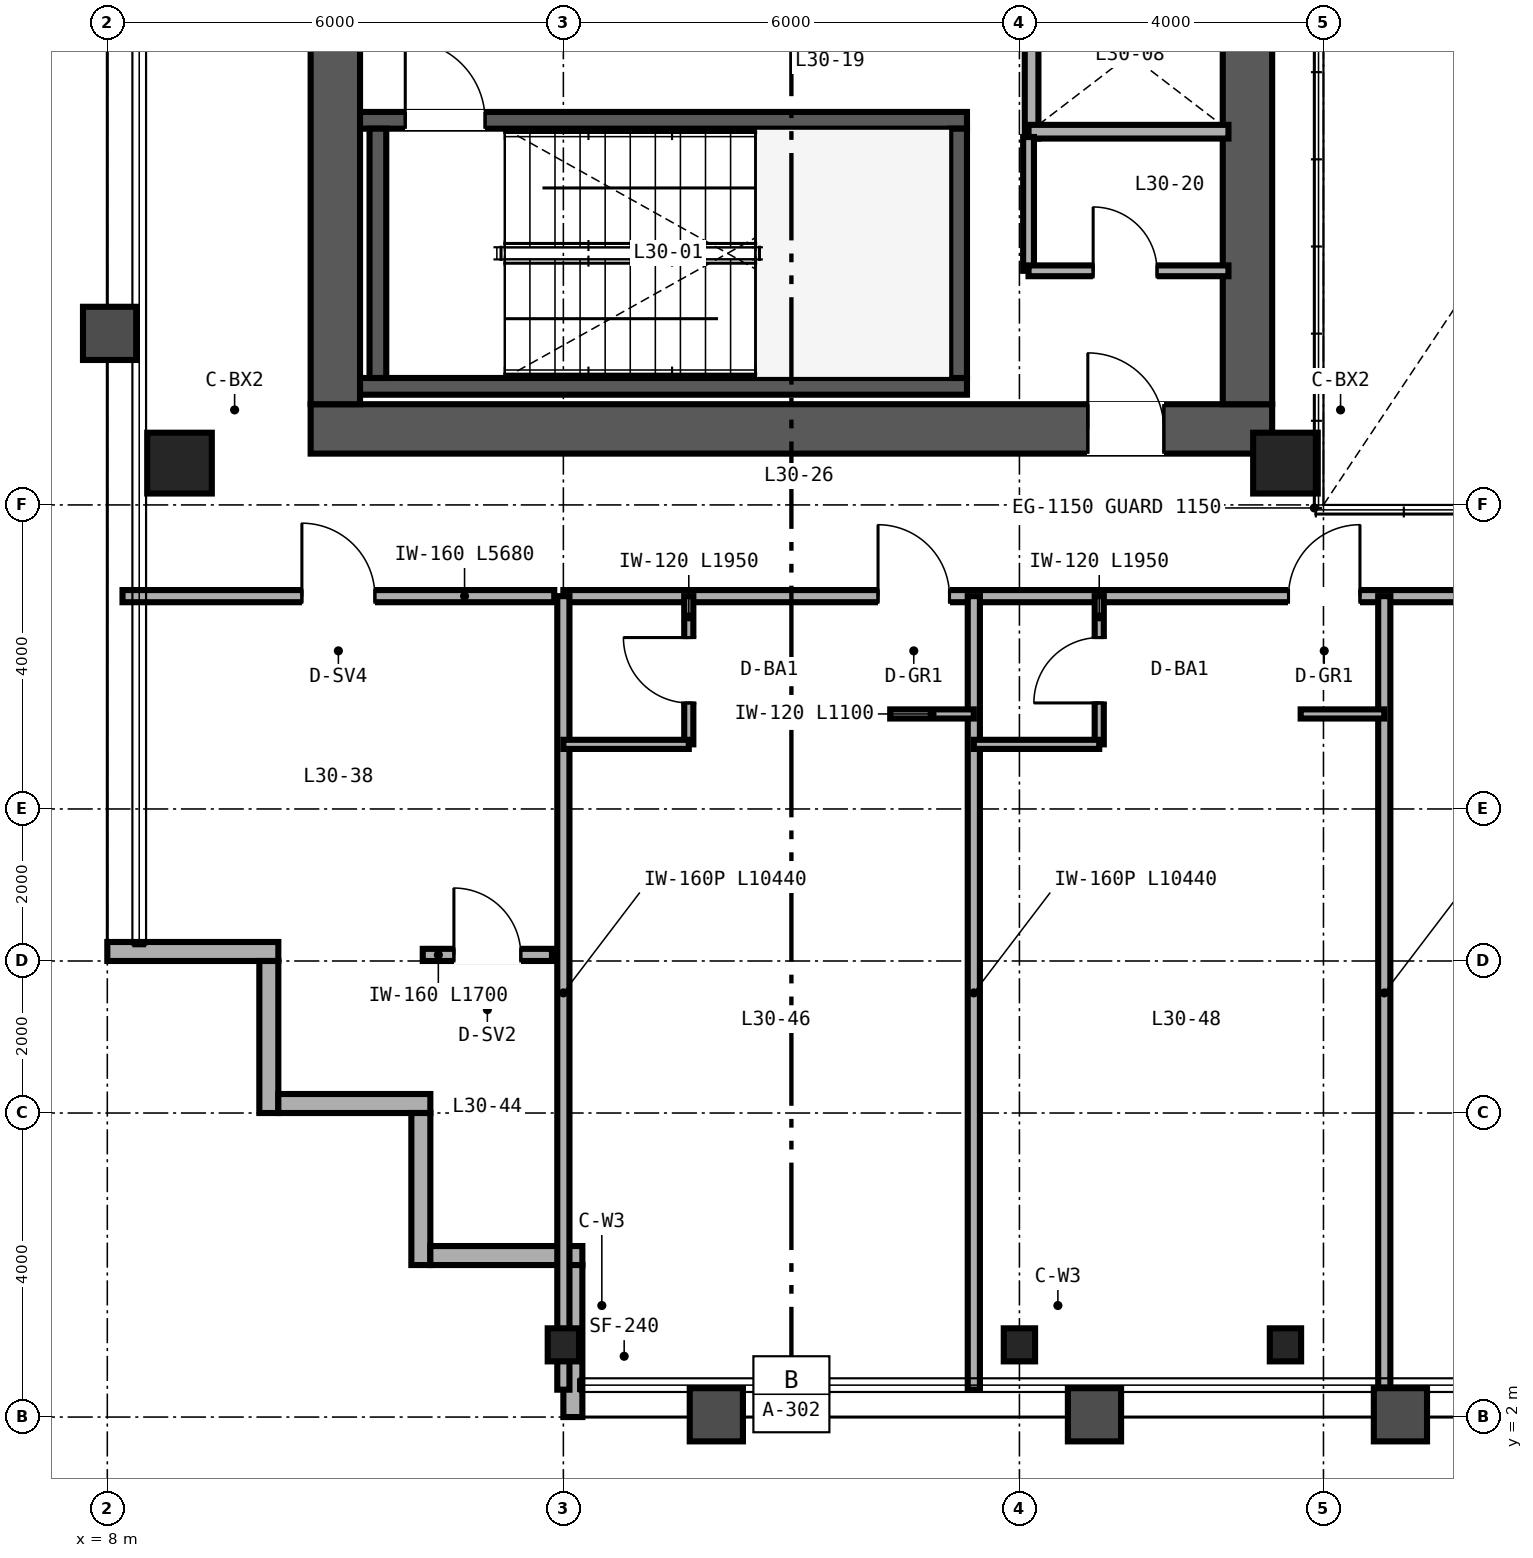
"""IFC4 building model, lengths in metres.
Left out: names, types, materials, properties, quantities, classifications, styles, units other than length and angle.
Written with IfcOpenShell. Run it as: python <this file> out.ifc"""

import sys

from ifc_helpers import new_model, si_unit, direction, frame, frame_2d, origin, origin_2d, place, context, subcontext, project, spatial, rectangle, hollow_rectangle, i_section, extrude, source, transform, mapped, element, fill, save


model = new_model("IFC4")
c1 = context("Model", 3, precision=1e-05, world=origin(), true_north=direction((0.0, 1.0)))
c2 = subcontext(c1, "Body", "Model", "MODEL_VIEW")
j1 = project(units=[si_unit("LENGTHUNIT", "METRE"), si_unit("PLANEANGLEUNIT", "RADIAN")], contexts=[c1])
p1 = place(None, origin())
s1 = spatial("IfcSite", under=j1, at=p1, CompositionType="ELEMENT")
p2 = place(p1, origin())
s2 = spatial("IfcBuilding", under=s1, at=p2, CompositionType="ELEMENT")
p3 = place(p2, frame((0.0, 0.0, 122.4)))
s3 = spatial("IfcBuildingStorey", under=s2, at=p3, CompositionType="ELEMENT", Elevation=122.4)
p4 = place(p3, frame((10.675, 15.0, 0.0), z_axis=(0.0, 0.0, 1.0), x_axis=(1.0, 0.0, 0.0)))
e1 = element("IfcWall", 1, at=p4, inside=s3, PredefinedType="SHEAR", context=c2, shape_type="SweptSolid", body=[
    extrude(rectangle(XDim=12.65, YDim=0.65, at=frame_2d((6.325, 0.0))), origin(), (0.0, 0.0, 1.0), 3.36),
])
p5 = place(p4, frame((10.225, 0.0, 0.0)))
e2 = element("IfcOpeningElement", 2, at=p5, cuts=e1, PredefinedType="OPENING", context=c2, shape_type="SweptSolid", body=[
    extrude(rectangle(XDim=1.0, YDim=2.15, at=frame_2d((0.5, 1.075))), frame((0.0, 0.335, 0.0), z_axis=(0.0, -1.0, 0.0), x_axis=(1.0, 0.0, 0.0)), (0.0, 0.0, 1.0), 0.67),
])
for number, where, z_axis, x_axis in (
    (3, (11.0, 15.325, 0.0), (0.0, 0.0, 1.0), (0.0, 1.0, 0.0)),
    (4, (23.0, 15.325, 0.0), (0.0, 0.0, 1.0), (0.0, 1.0, 0.0)),
):
    element("IfcWall", number, at=place(p3, frame(where, z_axis=z_axis, x_axis=x_axis)), inside=s3, PredefinedType="SHEAR", context=c2, shape_type="SweptSolid", body=[
        extrude(rectangle(XDim=21.35, YDim=0.65, at=frame_2d((10.675, 0.0))), origin(), (0.0, 0.0, 1.0), 3.36),
    ])
p6 = place(p3, frame((11.325, 15.56, 0.0), z_axis=(0.0, 0.0, 1.0), x_axis=(1.0, 0.0, 0.0)))
e5 = element("IfcWall", 5, at=p6, inside=s3, PredefinedType="SHEAR", context=c2, shape_type="SweptSolid", body=[
    extrude(rectangle(XDim=7.985, YDim=0.22, at=frame_2d((3.993, 0.0))), origin(), (0.0, 0.0, 1.0), 3.4),
])
p7 = place(p3, frame((11.325, 19.06, 0.0), z_axis=(0.0, 0.0, 1.0), x_axis=(1.0, 0.0, 0.0)))
e6 = element("IfcWall", 6, at=p7, inside=s3, PredefinedType="SHEAR", context=c2, shape_type="SweptSolid", body=[
    extrude(rectangle(XDim=7.985, YDim=0.22, at=frame_2d((3.993, 0.0))), origin(), (0.0, 0.0, 1.0), 3.4),
])
p8 = place(p7, frame((0.595, 0.0, 0.0)))
e7 = element("IfcOpeningElement", 7, at=p8, cuts=e6, PredefinedType="OPENING", context=c2, shape_type="SweptSolid", body=[
    extrude(rectangle(XDim=1.05, YDim=2.15, at=frame_2d((0.525, 1.075))), frame((0.0, 0.12, 0.0), z_axis=(0.0, -1.0, 0.0), x_axis=(1.0, 0.0, 0.0)), (0.0, 0.0, 1.0), 0.24),
])
for number, where, z_axis, x_axis in (
    (8, (11.56, 15.67, 0.0), (0.0, 0.0, 1.0), (0.0, 1.0, 0.0)),
    (9, (19.2, 15.67, 0.0), (0.0, 0.0, 1.0), (0.0, 1.0, 0.0)),
):
    element("IfcWall", number, at=place(p3, frame(where, z_axis=z_axis, x_axis=x_axis)), inside=s3, PredefinedType="SHEAR", context=c2, shape_type="SweptSolid", body=[
        extrude(rectangle(XDim=3.28, YDim=0.22, at=frame_2d((1.64, 0.0))), origin(), (0.0, 0.0, 1.0), 3.4),
    ])
m1 = source(origin(), c2, "Body", "SweptSolid", [
    extrude(hollow_rectangle(XDim=0.85, YDim=0.8, WallThickness=0.032, at=origin_2d()), origin(), (0.0, 0.0, 1.0), 3.36),
])
for number, where, z_axis, x_axis in (
    (10, (8.95, 14.55, 0.0), (0.0, 0.0, 1.0), (1.0, 0.0, 0.0)),
    (11, (23.5, 14.55, 0.0), (0.0, 0.0, 1.0), (1.0, 0.0, 0.0)),
):
    element("IfcColumn", number, at=place(p3, frame(where, z_axis=z_axis, x_axis=x_axis)), inside=s3, PredefinedType="COLUMN", context=c2, shape_type="MappedRepresentation", body=[
        mapped(m1, transform((0.0, 0.0, 0.0), scale=1.0)),
    ])
m2 = source(origin(), c2, "Body", "SweptSolid", [
    extrude(i_section(OverallWidth=0.412, OverallDepth=0.435, WebThickness=0.036, FlangeThickness=0.057, FilletRadius=0.025, at=origin_2d()), origin(), (0.0, 0.0, 1.0), 3.36),
])
for number, where, z_axis, x_axis in (
    (12, (14.0, 2.95, 0.0), (0.0, 0.0, 1.0), (1.0, 0.0, 0.0)),
    (13, (20.0, 2.95, 0.0), (0.0, 0.0, 1.0), (1.0, 0.0, 0.0)),
    (14, (23.5, 2.95, 0.0), (0.0, 0.0, 1.0), (1.0, 0.0, 0.0)),
):
    element("IfcColumn", number, at=place(p3, frame(where, z_axis=z_axis, x_axis=x_axis)), inside=s3, PredefinedType="COLUMN", context=c2, shape_type="MappedRepresentation", body=[
        mapped(m2, transform((0.0, 0.0, 0.0), scale=1.0)),
    ])
p9 = place(p3, frame((8.0, 8.125, 0.0), z_axis=(0.0, 0.0, 1.0), x_axis=(1.0, 0.0, 0.0)))
e15 = element("IfcWall", 15, at=p9, inside=s3, PredefinedType="SOLIDWALL", context=c2, shape_type="SweptSolid", body=[
    extrude(rectangle(XDim=2.25, YDim=0.25, at=frame_2d((1.125, 0.0))), origin(), (0.0, 0.0, 1.0), 3.36),
])
for number, where, z_axis, x_axis in (
    (16, (10.125, 8.0, 0.0), (0.0, 0.0, 1.0), (0.0, -1.0, 0.0)),
    (17, (10.25, 6.125, 0.0), (0.0, 0.0, 1.0), (1.0, 0.0, 0.0)),
    (18, (12.125, 6.0, 0.0), (0.0, 0.0, 1.0), (0.0, -1.0, 0.0)),
    (19, (12.25, 4.125, 0.0), (0.0, 0.0, 1.0), (1.0, 0.0, 0.0)),
):
    element("IfcWall", number, at=place(p3, frame(where, z_axis=z_axis, x_axis=x_axis)), inside=s3, PredefinedType="SOLIDWALL", context=c2, shape_type="SweptSolid", body=[
        extrude(rectangle(XDim=2.0, YDim=0.25, at=frame_2d((1.0, 0.0))), origin(), (0.0, 0.0, 1.0), 3.36),
    ])
p10 = place(p3, frame((14.125, 4.0, 0.0), z_axis=(0.0, 0.0, 1.0), x_axis=(0.0, -1.0, 0.0)))
e20 = element("IfcWall", 20, at=p10, inside=s3, PredefinedType="SOLIDWALL", context=c2, shape_type="SweptSolid", body=[
    extrude(rectangle(XDim=2.0, YDim=0.25, at=frame_2d((1.0, 0.0))), origin(), (0.0, 0.0, 1.0), 2.667),
])
p11 = place(p3, frame((20.16, 18.82, 0.0), z_axis=(0.0, 0.0, 1.0), x_axis=(0.0, 1.0, 0.0)))
e21 = element("IfcWall", 21, at=p11, inside=s3, PredefinedType="SOLIDWALL", context=c2, shape_type="SweptSolid", body=[
    extrude(rectangle(XDim=6.32, YDim=0.18, at=frame_2d((3.16, 0.0))), origin(), (0.0, 0.0, 1.0), 2.36),
])
p12 = place(p3, frame((20.12, 18.91, 0.0), z_axis=(0.0, 0.0, 1.0), x_axis=(1.0, 0.0, 0.0)))
e22 = element("IfcWall", 22, at=p12, inside=s3, PredefinedType="SOLIDWALL", context=c2, shape_type="SweptSolid", body=[
    extrude(rectangle(XDim=2.63, YDim=0.18, at=frame_2d((1.315, 0.0))), origin(), (0.0, 0.0, 1.0), 3.36),
])
p13 = place(p3, frame((20.12, 17.08, 0.0), z_axis=(0.0, 0.0, 1.0), x_axis=(0.0, 1.0, 0.0)))
e23 = element("IfcWall", 23, at=p13, inside=s3, PredefinedType="PARTITIONING", context=c2, shape_type="SweptSolid", body=[
    extrude(rectangle(XDim=1.76, YDim=0.142, at=frame_2d((0.88, 0.0))), origin(), (0.0, 0.0, 1.0), 3.36),
])
p14 = place(p3, frame((20.12, 17.08, 0.0), z_axis=(0.0, 0.0, 1.0), x_axis=(1.0, 0.0, 0.0)))
e24 = element("IfcWall", 24, at=p14, inside=s3, PredefinedType="PARTITIONING", context=c2, shape_type="SweptSolid", body=[
    extrude(rectangle(XDim=2.63, YDim=0.142, at=frame_2d((1.315, 0.0))), origin(), (0.0, 0.0, 1.0), 3.36),
])
p15 = place(p14, frame((0.85, 0.0, 0.0)))
e25 = element("IfcOpeningElement", 25, at=p15, cuts=e24, PredefinedType="OPENING", context=c2, shape_type="SweptSolid", body=[
    extrude(rectangle(XDim=0.84, YDim=2.1, at=frame_2d((0.42, 1.05))), frame((0.0, 0.081, 0.0), z_axis=(0.0, -1.0, 0.0), x_axis=(1.0, 0.0, 0.0)), (0.0, 0.0, 1.0), 0.162),
])
p16 = place(p3, frame((8.2, 12.8, 0.0), z_axis=(0.0, 0.0, 1.0), x_axis=(1.0, 0.0, 0.0)))
e26 = element("IfcWall", 26, at=p16, inside=s3, PredefinedType="PARTITIONING", context=c2, shape_type="SweptSolid", body=[
    extrude(rectangle(XDim=5.68, YDim=0.16, at=frame_2d((2.84, 0.0))), origin(), (0.0, 0.0, 1.0), 3.36),
])
p17 = place(p16, frame((2.36, 0.0, 0.0)))
e27 = element("IfcOpeningElement", 27, at=p17, cuts=e26, PredefinedType="OPENING", context=c2, shape_type="SweptSolid", body=[
    extrude(rectangle(XDim=0.96, YDim=2.15, at=frame_2d((0.48, 1.075))), frame((0.0, 0.09, 0.0), z_axis=(0.0, -1.0, 0.0), x_axis=(1.0, 0.0, 0.0)), (0.0, 0.0, 1.0), 0.18),
])
p18 = place(p3, frame((12.15, 8.08, 0.0), z_axis=(0.0, 0.0, 1.0), x_axis=(1.0, 0.0, 0.0)))
e28 = element("IfcWall", 28, at=p18, inside=s3, PredefinedType="PARTITIONING", context=c2, shape_type="SweptSolid", body=[
    extrude(rectangle(XDim=1.7, YDim=0.16, at=frame_2d((0.85, 0.0))), origin(), (0.0, 0.0, 1.0), 3.36),
])
p19 = place(p18, frame((0.41, 0.0, 0.0)))
e29 = element("IfcOpeningElement", 29, at=p19, cuts=e28, PredefinedType="OPENING", context=c2, shape_type="SweptSolid", body=[
    extrude(rectangle(XDim=0.88, YDim=2.15, at=frame_2d((0.44, 1.075))), frame((0.0, 0.09, 0.0), z_axis=(0.0, -1.0, 0.0), x_axis=(1.0, 0.0, 0.0)), (0.0, 0.0, 1.0), 0.18),
])
p20 = place(p3, frame((14.0, 12.8, 0.0), z_axis=(0.0, 0.0, 1.0), x_axis=(1.0, 0.0, 0.0)))
e30 = element("IfcWall", 30, at=p20, inside=s3, PredefinedType="PARTITIONING", context=c2, shape_type="SweptSolid", body=[
    extrude(rectangle(XDim=36.0, YDim=0.16, at=frame_2d((18.0, 0.0))), origin(), (0.0, 0.0, 1.0), 2.581),
])
p21 = place(p20, frame((4.14, 0.0, 0.0)))
e31 = element("IfcOpeningElement", 31, at=p21, cuts=e30, PredefinedType="OPENING", context=c2, shape_type="SweptSolid", body=[
    extrude(rectangle(XDim=0.94, YDim=2.15, at=frame_2d((0.47, 1.075))), frame((0.0, 0.09, 0.0), z_axis=(0.0, -1.0, 0.0), x_axis=(1.0, 0.0, 0.0)), (0.0, 0.0, 1.0), 0.18),
])
p22 = place(p20, frame((9.54, 0.0, 0.0)))
e32 = element("IfcOpeningElement", 32, at=p22, cuts=e30, PredefinedType="OPENING", context=c2, shape_type="SweptSolid", body=[
    extrude(rectangle(XDim=0.94, YDim=2.15, at=frame_2d((0.47, 1.075))), frame((0.0, 0.09, 0.0), z_axis=(0.0, -1.0, 0.0), x_axis=(1.0, 0.0, 0.0)), (0.0, 0.0, 1.0), 0.18),
])
p23 = place(p20, frame((13.22, 0.0, 0.0)))
e33 = element("IfcOpeningElement", 33, at=p23, cuts=e30, PredefinedType="OPENING", context=c2, shape_type="SweptSolid", body=[
    extrude(rectangle(XDim=0.96, YDim=2.15, at=frame_2d((0.48, 1.075))), frame((0.0, 0.09, 0.0), z_axis=(0.0, -1.0, 0.0), x_axis=(1.0, 0.0, 0.0)), (0.0, 0.0, 1.0), 0.18),
])
p24 = place(p20, frame((19.02, 0.0, 0.0)))
e34 = element("IfcOpeningElement", 34, at=p24, cuts=e30, PredefinedType="OPENING", context=c2, shape_type="SweptSolid", body=[
    extrude(rectangle(XDim=0.96, YDim=2.15, at=frame_2d((0.48, 1.075))), frame((0.0, 0.09, 0.0), z_axis=(0.0, -1.0, 0.0), x_axis=(1.0, 0.0, 0.0)), (0.0, 0.0, 1.0), 0.18),
])
p25 = place(p20, frame((24.62, 0.0, 0.0)))
e35 = element("IfcOpeningElement", 35, at=p25, cuts=e30, PredefinedType="OPENING", context=c2, shape_type="SweptSolid", body=[
    extrude(rectangle(XDim=0.96, YDim=2.15, at=frame_2d((0.48, 1.075))), frame((0.0, 0.09, 0.0), z_axis=(0.0, -1.0, 0.0), x_axis=(1.0, 0.0, 0.0)), (0.0, 0.0, 1.0), 0.18),
])
p26 = place(p20, frame((30.74, 0.0, 0.0)))
e36 = element("IfcOpeningElement", 36, at=p26, cuts=e30, PredefinedType="OPENING", context=c2, shape_type="SweptSolid", body=[
    extrude(rectangle(XDim=0.94, YDim=2.15, at=frame_2d((0.47, 1.075))), frame((0.0, 0.09, 0.0), z_axis=(0.0, -1.0, 0.0), x_axis=(1.0, 0.0, 0.0)), (0.0, 0.0, 1.0), 0.18),
])
p27 = place(p20, frame((33.52, 0.0, 0.0)))
e37 = element("IfcOpeningElement", 37, at=p27, cuts=e30, PredefinedType="OPENING", context=c2, shape_type="SweptSolid", body=[
    extrude(rectangle(XDim=0.96, YDim=2.15, at=frame_2d((0.48, 1.075))), frame((0.0, 0.09, 0.0), z_axis=(0.0, -1.0, 0.0), x_axis=(1.0, 0.0, 0.0)), (0.0, 0.0, 1.0), 0.18),
])
for number, where, z_axis, x_axis in (
    (38, (14.0, 2.36, 0.0), (0.0, 0.0, 1.0), (0.0, 1.0, 0.0)),
    (39, (19.4, 2.36, 0.0), (0.0, 0.0, 1.0), (0.0, 1.0, 0.0)),
):
    element("IfcWall", number, at=place(p3, frame(where, z_axis=z_axis, x_axis=x_axis)), inside=s3, PredefinedType="PARTITIONING", context=c2, shape_type="SweptSolid", body=[
        extrude(rectangle(XDim=10.44, YDim=0.16, at=frame_2d((5.22, 0.0))), origin(), (0.0, 0.0, 1.0), 2.667),
    ])
p28 = place(p3, frame((15.65, 10.85, 0.0), z_axis=(0.0, 0.0, 1.0), x_axis=(0.0, 1.0, 0.0)))
e40 = element("IfcWall", 40, at=p28, inside=s3, PredefinedType="PARTITIONING", context=c2, shape_type="SweptSolid", body=[
    extrude(rectangle(XDim=1.95, YDim=0.12, at=frame_2d((0.975, 0.0))), origin(), (0.0, 0.0, 1.0), 3.36),
])
p29 = place(p28, frame((0.545, 0.0, 0.0)))
e41 = element("IfcOpeningElement", 41, at=p29, cuts=e40, PredefinedType="OPENING", context=c2, shape_type="SweptSolid", body=[
    extrude(rectangle(XDim=0.86, YDim=2.1, at=frame_2d((0.43, 1.05))), frame((0.0, 0.07, 0.0), z_axis=(0.0, -1.0, 0.0), x_axis=(1.0, 0.0, 0.0)), (0.0, 0.0, 1.0), 0.14),
])
p30 = place(p3, frame((14.0, 10.85, 0.0), z_axis=(0.0, 0.0, 1.0), x_axis=(1.0, 0.0, 0.0)))
e42 = element("IfcWall", 42, at=p30, inside=s3, PredefinedType="PARTITIONING", context=c2, shape_type="SweptSolid", body=[
    extrude(rectangle(XDim=1.65, YDim=0.12, at=frame_2d((0.825, 0.0))), origin(), (0.0, 0.0, 1.0), 3.36),
])
p31 = place(p3, frame((18.3, 11.25, 0.0), z_axis=(0.0, 0.0, 1.0), x_axis=(1.0, 0.0, 0.0)))
e43 = element("IfcWall", 43, at=p31, inside=s3, PredefinedType="PARTITIONING", context=c2, shape_type="SweptSolid", body=[
    extrude(rectangle(XDim=1.1, YDim=0.12, at=frame_2d((0.55, 0.0))), origin(), (0.0, 0.0, 1.0), 3.36),
])
p32 = place(p3, frame((24.8, 2.36, 0.0), z_axis=(0.0, 0.0, 1.0), x_axis=(0.0, 1.0, 0.0)))
e44 = element("IfcWall", 44, at=p32, inside=s3, PredefinedType="PARTITIONING", context=c2, shape_type="SweptSolid", body=[
    extrude(rectangle(XDim=10.44, YDim=0.16, at=frame_2d((5.22, 0.0))), origin(), (0.0, 0.0, 1.0), 2.433),
])
p33 = place(p3, frame((21.05, 10.85, 0.0), z_axis=(0.0, 0.0, 1.0), x_axis=(0.0, 1.0, 0.0)))
e45 = element("IfcWall", 45, at=p33, inside=s3, PredefinedType="PARTITIONING", context=c2, shape_type="SweptSolid", body=[
    extrude(rectangle(XDim=1.95, YDim=0.12, at=frame_2d((0.975, 0.0))), origin(), (0.0, 0.0, 1.0), 3.36),
])
p34 = place(p33, frame((0.545, 0.0, 0.0)))
e46 = element("IfcOpeningElement", 46, at=p34, cuts=e45, PredefinedType="OPENING", context=c2, shape_type="SweptSolid", body=[
    extrude(rectangle(XDim=0.86, YDim=2.1, at=frame_2d((0.43, 1.05))), frame((0.0, 0.07, 0.0), z_axis=(0.0, -1.0, 0.0), x_axis=(1.0, 0.0, 0.0)), (0.0, 0.0, 1.0), 0.14),
])
p35 = place(p3, frame((19.4, 10.85, 0.0), z_axis=(0.0, 0.0, 1.0), x_axis=(1.0, 0.0, 0.0)))
e47 = element("IfcWall", 47, at=p35, inside=s3, PredefinedType="PARTITIONING", context=c2, shape_type="SweptSolid", body=[
    extrude(rectangle(XDim=1.65, YDim=0.12, at=frame_2d((0.825, 0.0))), origin(), (0.0, 0.0, 1.0), 3.36),
])
p36 = place(p3, frame((23.7, 11.25, 0.0), z_axis=(0.0, 0.0, 1.0), x_axis=(1.0, 0.0, 0.0)))
e48 = element("IfcWall", 48, at=p36, inside=s3, PredefinedType="PARTITIONING", context=c2, shape_type="SweptSolid", body=[
    extrude(rectangle(XDim=1.1, YDim=0.12, at=frame_2d((0.55, 0.0))), origin(), (0.0, 0.0, 1.0), 2.581),
])
m3 = source(origin(), c2, "Body", "SweptSolid", [
    extrude(rectangle(XDim=1.05, YDim=2.15, at=frame_2d((0.525, 1.075))), frame((0.0, 0.025, 0.0), z_axis=(0.0, -1.0, 0.0), x_axis=(1.0, 0.0, 0.0)), (0.0, 0.0, 1.0), 0.05),
])
p37 = place(p8, origin())
e49 = element("IfcDoor", 49, at=p37, inside=s3, OperationType="SINGLE_SWING_LEFT", PredefinedType="DOOR", context=c2, shape_type="MappedRepresentation", body=[
    mapped(m3, transform((0.0, 0.0, 0.0), scale=1.0)),
])
fill(e7, e49)
m4 = source(origin(), c2, "Body", "SweptSolid", [
    extrude(rectangle(XDim=0.84, YDim=2.1, at=frame_2d((0.42, 1.05))), frame((0.0, 0.025, 0.0), z_axis=(0.0, -1.0, 0.0), x_axis=(1.0, 0.0, 0.0)), (0.0, 0.0, 1.0), 0.05),
])
p38 = place(p15, origin())
e50 = element("IfcDoor", 50, at=p38, inside=s3, OperationType="SINGLE_SWING_LEFT", PredefinedType="DOOR", context=c2, shape_type="MappedRepresentation", body=[
    mapped(m4, transform((0.0, 0.0, 0.0), scale=1.0)),
])
fill(e25, e50)
m5 = source(origin(), c2, "Body", "SweptSolid", [
    extrude(rectangle(XDim=1.0, YDim=2.15, at=frame_2d((0.5, 1.075))), frame((0.0, 0.025, 0.0), z_axis=(0.0, -1.0, 0.0), x_axis=(1.0, 0.0, 0.0)), (0.0, 0.0, 1.0), 0.05),
])
p39 = place(p5, origin())
e51 = element("IfcDoor", 51, at=p39, inside=s3, OperationType="SINGLE_SWING_LEFT", PredefinedType="DOOR", context=c2, shape_type="MappedRepresentation", body=[
    mapped(m5, transform((0.0, 0.0, 0.0), scale=1.0)),
])
fill(e2, e51)
m6 = source(origin(), c2, "Body", "SweptSolid", [
    extrude(rectangle(XDim=0.96, YDim=2.15, at=frame_2d((0.48, 1.075))), frame((0.0, 0.025, 0.0), z_axis=(0.0, -1.0, 0.0), x_axis=(1.0, 0.0, 0.0)), (0.0, 0.0, 1.0), 0.05),
])
p40 = place(p17, origin())
e52 = element("IfcDoor", 52, at=p40, inside=s3, OperationType="SINGLE_SWING_LEFT", PredefinedType="DOOR", context=c2, shape_type="MappedRepresentation", body=[
    mapped(m6, transform((0.0, 0.0, 0.0), scale=1.0)),
])
fill(e27, e52)
m7 = source(origin(), c2, "Body", "SweptSolid", [
    extrude(rectangle(XDim=0.88, YDim=2.15, at=frame_2d((0.44, 1.075))), frame((0.0, 0.025, 0.0), z_axis=(0.0, -1.0, 0.0), x_axis=(1.0, 0.0, 0.0)), (0.0, 0.0, 1.0), 0.05),
])
p41 = place(p19, origin())
e53 = element("IfcDoor", 53, at=p41, inside=s3, OperationType="SINGLE_SWING_LEFT", PredefinedType="DOOR", context=c2, shape_type="MappedRepresentation", body=[
    mapped(m7, transform((0.0, 0.0, 0.0), scale=1.0)),
])
fill(e29, e53)
m8 = source(origin(), c2, "Body", "SweptSolid", [
    extrude(rectangle(XDim=0.86, YDim=2.1, at=frame_2d((0.43, 1.05))), frame((0.0, 0.025, 0.0), z_axis=(0.0, -1.0, 0.0), x_axis=(1.0, 0.0, 0.0)), (0.0, 0.0, 1.0), 0.05),
])
p42 = place(p29, origin())
e54 = element("IfcDoor", 54, at=p42, inside=s3, OperationType="SINGLE_SWING_RIGHT", PredefinedType="DOOR", context=c2, shape_type="MappedRepresentation", body=[
    mapped(m8, transform((0.0, 0.0, 0.0), scale=1.0)),
])
fill(e41, e54)
p43 = place(p34, origin())
e55 = element("IfcDoor", 55, at=p43, inside=s3, OperationType="SINGLE_SWING_LEFT", PredefinedType="DOOR", context=c2, shape_type="MappedRepresentation", body=[
    mapped(m8, transform((0.0, 0.0, 0.0), scale=1.0)),
])
fill(e46, e55)
m9 = source(origin(), c2, "Body", "SweptSolid", [
    extrude(rectangle(XDim=0.94, YDim=2.15, at=frame_2d((0.47, 1.075))), frame((0.0, 0.025, 0.0), z_axis=(0.0, -1.0, 0.0), x_axis=(1.0, 0.0, 0.0)), (0.0, 0.0, 1.0), 0.05),
])
p44 = place(p21, origin())
e56 = element("IfcDoor", 56, at=p44, inside=s3, OperationType="SINGLE_SWING_LEFT", PredefinedType="DOOR", context=c2, shape_type="MappedRepresentation", body=[
    mapped(m9, transform((0.0, 0.0, 0.0), scale=1.0)),
])
fill(e31, e56)
p45 = place(p22, origin())
e57 = element("IfcDoor", 57, at=p45, inside=s3, OperationType="SINGLE_SWING_RIGHT", PredefinedType="DOOR", context=c2, shape_type="MappedRepresentation", body=[
    mapped(m9, transform((0.0, 0.0, 0.0), scale=1.0)),
])
fill(e32, e57)
save(model, sys.argv[1])
